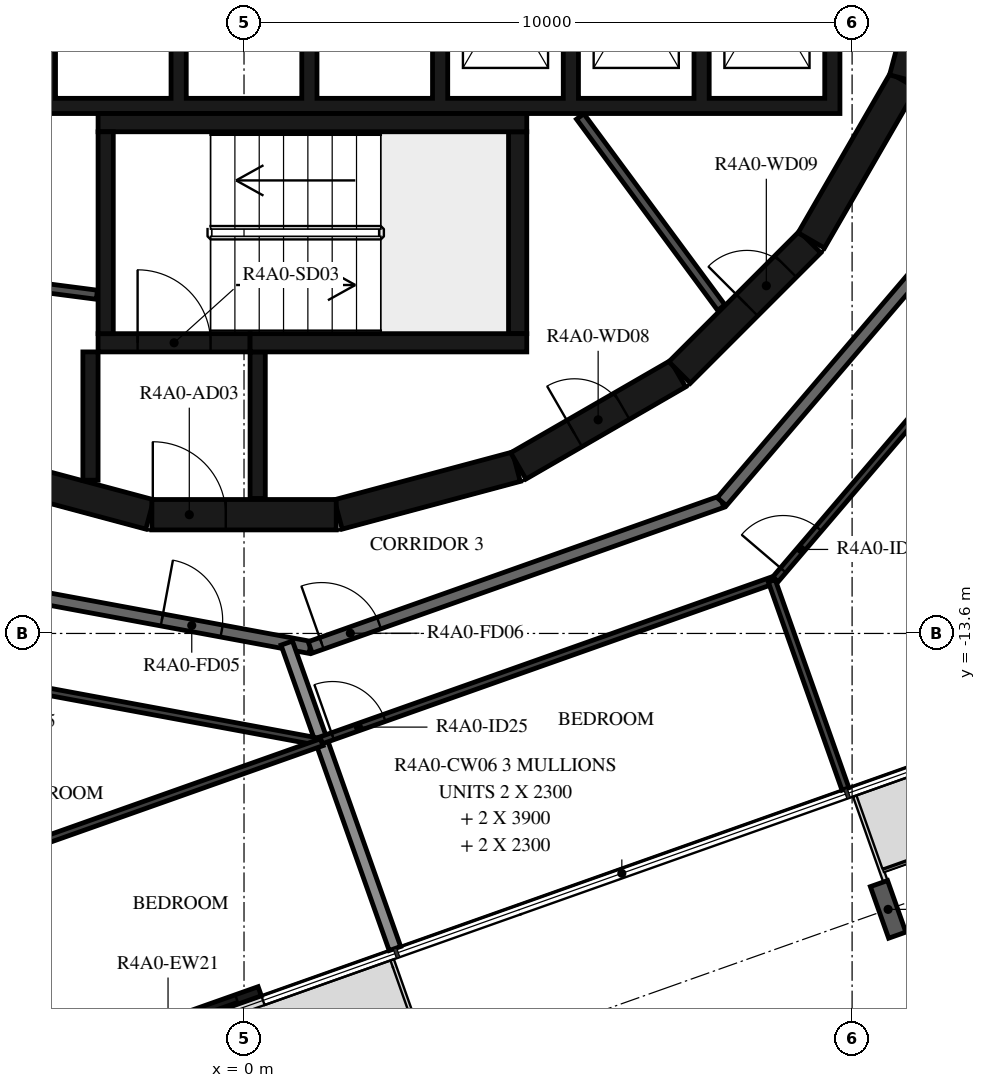
"""IFC4 building model, lengths in metres.
Left out: names, types, materials, properties, quantities, classifications, styles, units other than length and angle.
Written with IfcOpenShell. Run it as: python <this file> out.ifc"""

import sys

from ifc_helpers import new_model, si_unit, direction, frame, frame_2d, origin, origin_2d, place, context, subcontext, project, spatial, polyline, rectangle, i_section, outline, extrude, element, fill, save


model = new_model("IFC4")
c1 = context("Model", 3, precision=1e-05, world=origin(), true_north=direction((0.0, 1.0)))
c2 = subcontext(c1, "Body", "Model", "MODEL_VIEW")
j1 = project(units=[si_unit("LENGTHUNIT", "METRE"), si_unit("PLANEANGLEUNIT", "RADIAN")], contexts=[c1])
p1 = place(None, origin())
s1 = spatial("IfcSite", under=j1, at=p1, CompositionType="ELEMENT")
p2 = place(p1, origin())
s2 = spatial("IfcBuilding", under=s1, at=p2, CompositionType="ELEMENT")
p3 = place(p2, frame((0.0, 0.0, 158.7)))
s3 = spatial("IfcBuildingStorey", under=s2, at=p3, CompositionType="ELEMENT", Elevation=158.7)
p4 = place(p3, frame((10.592, -18.138, -0.38), z_axis=(0.0, 0.0, 1.0), x_axis=(-0.942641392079, -0.333807138839, 0.0)))
e1 = element("IfcColumn", 1, at=p4, inside=s3, PredefinedType="COLUMN", context=c2, shape_type="SweptSolid", body=[
    extrude(i_section(OverallWidth=0.3, OverallDepth=0.9, WebThickness=0.019, FlangeThickness=0.035, FilletRadius=0.03, at=origin_2d()), origin(), (0.0, 0.0, 1.0), 3.5),
])
p5 = place(p3, frame((-2.758, -20.552, 0.0), z_axis=(0.0, 0.0, 1.0), x_axis=(0.94265323131, 0.333773704029, 0.0)))
e2 = element("IfcWall", 2, at=p5, inside=s3, PredefinedType="STANDARD", context=c2, shape_type="SweptSolid", body=[
    extrude(rectangle(XDim=3.2, YDim=0.16, at=frame_2d((1.6, 0.0))), origin(), (0.0, 0.0, 1.0), 3.12),
])
p6 = place(p5, frame((0.4, 0.0, 0.0)))
e3 = element("IfcOpeningElement", 3, at=p6, cuts=e2, PredefinedType="OPENING", context=c2, shape_type="SweptSolid", body=[
    extrude(rectangle(XDim=2.4, YDim=2.4, at=frame_2d((1.2, 1.2))), frame((0.0, 0.09, 0.0), z_axis=(0.0, -1.0, 0.0), x_axis=(1.0, 0.0, 0.0)), (0.0, 0.0, 1.0), 0.18),
])
p7 = place(p3, frame((1.55, -11.643, 0.0), z_axis=(0.0, 0.0, 1.0), x_axis=(0.965948410781, 0.258734743916, 0.0)))
e4 = element("IfcWall", 4, at=p7, inside=s3, PredefinedType="SHEAR", context=c2, shape_type="SweptSolid", body=[
    extrude(rectangle(XDim=3.033, YDim=0.5, at=frame_2d((1.516, 0.0))), origin(), (0.0, 0.0, 1.0), 3.12),
])
p8 = place(p3, frame((4.51, -10.845, 0.0), z_axis=(0.0, 0.0, 1.0), x_axis=(0.865975092491, 0.500087131594, 0.0)))
e5 = element("IfcWall", 5, at=p8, inside=s3, PredefinedType="SHEAR", context=c2, shape_type="SweptSolid", body=[
    extrude(rectangle(XDim=3.033, YDim=0.5, at=frame_2d((1.516, 0.0))), origin(), (0.0, 0.0, 1.0), 3.12),
])
p9 = place(p8, frame((1.066, 0.0, 0.0)))
e6 = element("IfcOpeningElement", 6, at=p9, cuts=e5, PredefinedType="OPENING", context=c2, shape_type="SweptSolid", body=[
    extrude(rectangle(XDim=0.9, YDim=2.1, at=frame_2d((0.45, 1.05))), frame((0.0, 0.26, 0.0), z_axis=(0.0, -1.0, 0.0), x_axis=(1.0, 0.0, 0.0)), (0.0, 0.0, 1.0), 0.52),
])
p10 = place(p3, frame((7.164, -9.308, 0.0), z_axis=(0.0, 0.0, 1.0), x_axis=(0.707106781187, 0.707106781187, 0.0)))
e7 = element("IfcWall", 7, at=p10, inside=s3, PredefinedType="SHEAR", context=c2, shape_type="SweptSolid", body=[
    extrude(rectangle(XDim=3.032, YDim=0.5, at=frame_2d((1.516, 0.0))), origin(), (0.0, 0.0, 1.0), 3.12),
])
p11 = place(p10, frame((1.566, 0.0, 0.0)))
e8 = element("IfcOpeningElement", 8, at=p11, cuts=e7, PredefinedType="OPENING", context=c2, shape_type="SweptSolid", body=[
    extrude(rectangle(XDim=0.9, YDim=2.1, at=frame_2d((0.45, 1.05))), frame((0.0, 0.26, 0.0), z_axis=(0.0, -1.0, 0.0), x_axis=(1.0, 0.0, 0.0)), (0.0, 0.0, 1.0), 0.52),
])
for number, where, z_axis, x_axis in (
    (9, (9.329, -7.137, 0.0), (0.0, 0.0, 1.0), (0.5, 0.866, 0.0)),
    (10, (10.858, -4.479, 0.0), (0.0, 0.0, 1.0), (0.259, 0.966, 0.0)),
    (11, (-4.479, -10.858, 0.0), (0.0, 0.0, 1.0), (0.966, -0.259, 0.0)),
):
    element("IfcWall", number, at=place(p3, frame(where, z_axis=z_axis, x_axis=x_axis)), inside=s3, PredefinedType="SHEAR", context=c2, shape_type="SweptSolid", body=[
        extrude(rectangle(XDim=3.033, YDim=0.5, at=frame_2d((1.516, 0.0))), origin(), (0.0, 0.0, 1.0), 3.12),
    ])
p12 = place(p3, frame((-1.516, -11.647, 0.0), z_axis=(0.0, 0.0, 1.0), x_axis=(1.0, 0.0, 0.0)))
e12 = element("IfcWall", 12, at=p12, inside=s3, PredefinedType="SHEAR", context=c2, shape_type="SweptSolid", body=[
    extrude(rectangle(XDim=3.033, YDim=0.5, at=frame_2d((1.516, 0.0))), origin(), (0.0, 0.0, 1.0), 3.12),
])
p13 = place(p12, frame((0.016, 0.0, 0.0)))
e13 = element("IfcOpeningElement", 13, at=p13, cuts=e12, PredefinedType="OPENING", context=c2, shape_type="SweptSolid", body=[
    extrude(rectangle(XDim=1.2, YDim=2.1, at=frame_2d((0.6, 1.05))), frame((0.0, 0.26, 0.0), z_axis=(0.0, -1.0, 0.0), x_axis=(1.0, 0.0, 0.0)), (0.0, 0.0, 1.0), 0.52),
])
p14 = place(p3, frame((-2.275, -8.67, 0.0), z_axis=(0.0, 0.0, 1.0), x_axis=(0.0, 1.0, 0.0)))
e14 = element("IfcWall", 14, at=p14, inside=s3, PredefinedType="SHEAR", context=c2, shape_type="SweptSolid", body=[
    extrude(rectangle(XDim=3.32, YDim=0.25, at=frame_2d((1.66, 0.0))), origin(), (0.0, 0.0, 1.0), 3.12),
])
p15 = place(p3, frame((-2.4, -5.2, 0.0), z_axis=(0.0, 0.0, 1.0), x_axis=(1.0, 0.0, 0.0)))
e15 = element("IfcWall", 15, at=p15, inside=s3, PredefinedType="SHEAR", context=c2, shape_type="SweptSolid", body=[
    extrude(rectangle(XDim=7.05, YDim=0.3, at=frame_2d((3.525, 0.0))), origin(), (0.0, 0.0, 1.0), 3.12),
])
p16 = place(p3, frame((4.5, -8.67, 0.0), z_axis=(0.0, 0.0, 1.0), x_axis=(0.0, 1.0, 0.0)))
e16 = element("IfcWall", 16, at=p16, inside=s3, PredefinedType="SHEAR", context=c2, shape_type="SweptSolid", body=[
    extrude(rectangle(XDim=3.32, YDim=0.3, at=frame_2d((1.66, 0.0))), origin(), (0.0, 0.0, 1.0), 3.12),
])
p17 = place(p3, frame((0.1, -8.82, 0.0), z_axis=(0.0, 0.0, 1.0), x_axis=(1.0, 0.0, 0.0)))
e17 = element("IfcWall", 17, at=p17, inside=s3, PredefinedType="SHEAR", context=c2, shape_type="SweptSolid", body=[
    extrude(rectangle(XDim=4.55, YDim=0.3, at=frame_2d((2.275, 0.0))), origin(), (0.0, 0.0, 1.0), 3.12),
])
p18 = place(p3, frame((-2.4, -8.82, 0.0), z_axis=(0.0, 0.0, 1.0), x_axis=(1.0, 0.0, 0.0)))
e18 = element("IfcWall", 18, at=p18, inside=s3, PredefinedType="SHEAR", context=c2, shape_type="SweptSolid", body=[
    extrude(rectangle(XDim=2.5, YDim=0.3, at=frame_2d((1.25, 0.0))), origin(), (0.0, 0.0, 1.0), 3.12),
])
p19 = place(p18, frame((0.65, 0.0, 0.0)))
e19 = element("IfcOpeningElement", 19, at=p19, cuts=e18, PredefinedType="OPENING", context=c2, shape_type="SweptSolid", body=[
    extrude(rectangle(XDim=1.2, YDim=2.1, at=frame_2d((0.6, 1.05))), frame((0.0, 0.16, 0.0), z_axis=(0.0, -1.0, 0.0), x_axis=(1.0, 0.0, 0.0)), (0.0, 0.0, 1.0), 0.32),
])
p20 = place(p3, frame((-2.525, -8.97, 0.0), z_axis=(0.0, 0.0, 1.0), x_axis=(0.0, -1.0, 0.0)))
e20 = element("IfcWall", 20, at=p20, inside=s3, PredefinedType="SHEAR", context=c2, shape_type="SweptSolid", body=[
    extrude(rectangle(XDim=2.11, YDim=0.25, at=frame_2d((1.055, 0.0))), origin(), (0.0, 0.0, 1.0), 3.12),
])
p21 = place(p3, frame((0.225, -8.97, 0.0), z_axis=(0.0, 0.0, 1.0), x_axis=(0.0, -1.0, 0.0)))
e21 = element("IfcWall", 21, at=p21, inside=s3, PredefinedType="SHEAR", context=c2, shape_type="SweptSolid", body=[
    extrude(rectangle(XDim=2.41, YDim=0.25, at=frame_2d((1.205, 0.0))), origin(), (0.0, 0.0, 1.0), 3.12),
])
p22 = place(p3, origin())
e22 = element("IfcWall", 22, at=p22, inside=s3, PredefinedType="SHEAR", context=c2, shape_type="SweptSolid", body=[
    extrude(outline(polyline([(9.8, -5.05), (9.8, -4.8), (9.8, -1.9), (9.55, -1.9), (9.55, -4.8), (7.65, -4.8), (7.65, -1.9), (7.4, -1.9), (7.4, -4.8), (5.5, -4.8), (5.5, -1.9), (5.25, -1.9), (5.25, -4.8), (3.35, -4.8), (3.35, -1.9), (3.1, -1.9), (3.1, -4.8), (1.2, -4.8), (1.2, -1.9), (0.95, -1.9), (0.95, -4.8), (-0.95, -4.8), (-0.95, -1.9), (-1.2, -1.9), (-1.2, -4.8), (-3.1, -4.8), (-3.1, -1.9), (-3.35, -1.9), (-3.35, -4.8), (-5.25, -4.8), (-5.25, -1.9), (-5.5, -1.9), (-5.5, -4.8), (-7.4, -4.8), (-7.4, -1.9), (-7.65, -1.9), (-7.65, -4.8), (-9.55, -4.8), (-9.55, -1.9), (-9.8, -1.9), (-9.8, -4.8), (-9.8, -5.05), (9.8, -5.05)])), origin(), (0.0, 0.0, 1.0), 3.12),
])
p23 = place(p3, frame((5.528, -5.098, 0.0), z_axis=(0.0, 0.0, 1.0), x_axis=(0.594034318069, -0.804439698769, 0.0)))
e23 = element("IfcWall", 23, at=p23, inside=s3, PredefinedType="PARTITIONING", context=c2, shape_type="SweptSolid", body=[
    extrude(rectangle(XDim=3.907, YDim=0.15, at=frame_2d((1.953, 0.0))), origin(), (0.0, 0.0, 1.0), 3.12),
])
p24 = place(p3, frame((-4.198, -7.799, 0.0), z_axis=(0.0, 0.0, 1.0), x_axis=(0.991686747293, -0.128675542523, 0.0)))
e24 = element("IfcWall", 24, at=p24, inside=s3, PredefinedType="PARTITIONING", context=c2, shape_type="SweptSolid", body=[
    extrude(rectangle(XDim=1.793, YDim=0.15, at=frame_2d((0.896, 0.0))), origin(), (0.0, 0.0, 1.0), 3.12),
])
p25 = place(p3, frame((-5.972, -12.521, 0.0), z_axis=(0.0, 0.0, 1.0), x_axis=(0.983256068163, -0.18222926335, 0.0)))
e25 = element("IfcWall", 25, at=p25, inside=s3, PredefinedType="STANDARD", context=c2, shape_type="SweptSolid", body=[
    extrude(rectangle(XDim=7.181, YDim=0.2, at=frame_2d((3.59, 0.0))), origin(), (0.0, 0.0, 1.0), 3.12),
])
p26 = place(p25, frame((4.7, 0.0, 0.0)))
e26 = element("IfcOpeningElement", 26, at=p26, cuts=e25, PredefinedType="OPENING", context=c2, shape_type="SweptSolid", body=[
    extrude(rectangle(XDim=1.0, YDim=2.1, at=frame_2d((0.5, 1.05))), frame((0.0, 0.11, 0.0), z_axis=(0.0, -1.0, 0.0), x_axis=(1.0, 0.0, 0.0)), (0.0, 0.0, 1.0), 0.22),
])
p27 = place(p3, frame((1.088, -13.83, 0.0), z_axis=(0.0, 0.0, 1.0), x_axis=(0.942648397945, 0.333787354241, 0.0)))
e27 = element("IfcWall", 27, at=p27, inside=s3, PredefinedType="STANDARD", context=c2, shape_type="SweptSolid", body=[
    extrude(rectangle(XDim=7.181, YDim=0.2, at=frame_2d((3.591, 0.0))), origin(), (0.0, 0.0, 1.0), 3.12),
])
p28 = place(p27, frame((0.2, 0.0, 0.0)))
e28 = element("IfcOpeningElement", 28, at=p28, cuts=e27, PredefinedType="OPENING", context=c2, shape_type="SweptSolid", body=[
    extrude(rectangle(XDim=1.0, YDim=2.1, at=frame_2d((0.5, 1.05))), frame((0.0, 0.11, 0.0), z_axis=(0.0, -1.0, 0.0), x_axis=(1.0, 0.0, 0.0)), (0.0, 0.0, 1.0), 0.22),
])
p29 = place(p3, frame((7.858, -11.433, 0.0), z_axis=(0.0, 0.0, 1.0), x_axis=(0.649440801937, 0.760412154545, 0.0)))
e29 = element("IfcWall", 29, at=p29, inside=s3, PredefinedType="STANDARD", context=c2, shape_type="SweptSolid", body=[
    extrude(rectangle(XDim=7.181, YDim=0.2, at=frame_2d((3.59, 0.0))), origin(), (0.0, 0.0, 1.0), 3.12),
])
p30 = place(p3, frame((2.482, -18.782, 0.0), z_axis=(0.0, 0.0, 1.0), x_axis=(-0.333807281402, 0.942641341594, 0.0)))
e30 = element("IfcWall", 30, at=p30, inside=s3, PredefinedType="STANDARD", context=c2, shape_type="SweptSolid", body=[
    extrude(rectangle(XDim=5.329, YDim=0.2, at=frame_2d((2.665, 0.0))), origin(), (0.0, 0.0, 1.0), 2.73),
])
p31 = place(p3, frame((-6.641, -13.923, 0.0), z_axis=(0.0, 0.0, 1.0), x_axis=(0.983250157272, -0.182261153912, 0.0)))
e31 = element("IfcWall", 31, at=p31, inside=s3, PredefinedType="PARTITIONING", context=c2, shape_type="SweptSolid", body=[
    extrude(rectangle(XDim=7.985, YDim=0.12, at=frame_2d((3.992, 0.0))), origin(), (0.0, 0.0, 1.0), 3.12),
])
p32 = place(p31, frame((1.612, 0.0, 0.0)))
e32 = element("IfcOpeningElement", 32, at=p32, cuts=e31, PredefinedType="OPENING", context=c2, shape_type="SweptSolid", body=[
    extrude(rectangle(XDim=0.8, YDim=2.1, at=frame_2d((0.4, 1.05))), frame((0.0, 0.07, 0.0), z_axis=(0.0, -1.0, 0.0), x_axis=(1.0, 0.0, 0.0)), (0.0, 0.0, 1.0), 0.14),
])
p33 = place(p3, frame((-4.17, -17.318, 0.0), z_axis=(0.0, 0.0, 1.0), x_axis=(0.942641343532, 0.333807275931, 0.0)))
e33 = element("IfcWall", 33, at=p33, inside=s3, PredefinedType="PARTITIONING", context=c2, shape_type="SweptSolid", body=[
    extrude(rectangle(XDim=5.781, YDim=0.12, at=frame_2d((2.891, 0.0))), origin(), (0.0, 0.0, 1.0), 3.12),
])
p34 = place(p3, frame((1.269, -15.357, 0.0), z_axis=(0.0, 0.0, 1.0), x_axis=(0.942639442898, 0.333812643101, 0.0)))
e34 = element("IfcWall", 34, at=p34, inside=s3, PredefinedType="PARTITIONING", context=c2, shape_type="SweptSolid", body=[
    extrude(rectangle(XDim=7.86, YDim=0.12, at=frame_2d((3.93, 0.0))), origin(), (0.0, 0.0, 1.0), 3.12),
])
p35 = place(p34, frame((0.2, 0.0, 0.0)))
e35 = element("IfcOpeningElement", 35, at=p35, cuts=e34, PredefinedType="OPENING", context=c2, shape_type="SweptSolid", body=[
    extrude(rectangle(XDim=0.9, YDim=2.1, at=frame_2d((0.45, 1.05))), frame((0.0, 0.07, 0.0), z_axis=(0.0, -1.0, 0.0), x_axis=(1.0, 0.0, 0.0)), (0.0, 0.0, 1.0), 0.14),
])
p36 = place(p3, frame((8.737, -12.713, 0.0), z_axis=(0.0, 0.0, 1.0), x_axis=(0.649430604754, 0.760420863476, 0.0)))
e36 = element("IfcWall", 36, at=p36, inside=s3, PredefinedType="PARTITIONING", context=c2, shape_type="SweptSolid", body=[
    extrude(rectangle(XDim=7.985, YDim=0.12, at=frame_2d((3.992, 0.0))), origin(), (0.0, 0.0, 1.0), 3.12),
])
p37 = place(p36, frame((0.2, 0.0, 0.0)))
e37 = element("IfcOpeningElement", 37, at=p37, cuts=e36, PredefinedType="OPENING", context=c2, shape_type="SweptSolid", body=[
    extrude(rectangle(XDim=0.9, YDim=2.1, at=frame_2d((0.45, 1.05))), frame((0.0, 0.07, 0.0), z_axis=(0.0, -1.0, 0.0), x_axis=(1.0, 0.0, 0.0)), (0.0, 0.0, 1.0), 0.14),
])
p38 = place(p36, frame((6.234, 0.0, 0.0)))
e38 = element("IfcOpeningElement", 38, at=p38, cuts=e36, PredefinedType="OPENING", context=c2, shape_type="SweptSolid", body=[
    extrude(rectangle(XDim=0.8, YDim=2.1, at=frame_2d((0.4, 1.05))), frame((0.0, 0.07, 0.0), z_axis=(0.0, -1.0, 0.0), x_axis=(1.0, 0.0, 0.0)), (0.0, 0.0, 1.0), 0.14),
])
p39 = place(p3, frame((9.891, -16.158, 0.0), z_axis=(0.0, 0.0, 1.0), x_axis=(-0.33385336213, 0.942625022262, 0.0)))
e39 = element("IfcWall", 39, at=p39, inside=s3, PredefinedType="PARTITIONING", context=c2, shape_type="SweptSolid", body=[
    extrude(rectangle(XDim=3.633, YDim=0.12, at=frame_2d((1.816, 0.0))), origin(), (0.0, 0.0, 1.0), 2.73),
])
p40 = place(p6, origin())
e40 = element("IfcDoor", 40, at=p40, inside=s3, OperationType="DOUBLE_DOOR_SLIDING", PredefinedType="DOOR", context=c2, shape_type="SweptSolid", body=[
    extrude(rectangle(XDim=2.4, YDim=2.4, at=frame_2d((1.2, 1.2))), frame((0.0, 0.025, 0.0), z_axis=(0.0, -1.0, 0.0), x_axis=(1.0, 0.0, 0.0)), (0.0, 0.0, 1.0), 0.05),
])
fill(e3, e40)
p41 = place(p19, origin())
e41 = element("IfcDoor", 41, at=p41, inside=s3, OperationType="SINGLE_SWING_LEFT", PredefinedType="DOOR", context=c2, shape_type="SweptSolid", body=[
    extrude(rectangle(XDim=1.2, YDim=2.1, at=frame_2d((0.6, 1.05))), frame((0.0, 0.025, 0.0), z_axis=(0.0, -1.0, 0.0), x_axis=(1.0, 0.0, 0.0)), (0.0, 0.0, 1.0), 0.05),
])
fill(e19, e41)
p42 = place(p13, origin())
e42 = element("IfcDoor", 42, at=p42, inside=s3, OperationType="SINGLE_SWING_RIGHT", PredefinedType="DOOR", context=c2, shape_type="SweptSolid", body=[
    extrude(rectangle(XDim=1.2, YDim=2.1, at=frame_2d((0.6, 1.05))), frame((0.0, 0.025, 0.0), z_axis=(0.0, -1.0, 0.0), x_axis=(1.0, 0.0, 0.0)), (0.0, 0.0, 1.0), 0.05),
])
fill(e13, e42)
p43 = place(p9, origin())
e43 = element("IfcDoor", 43, at=p43, inside=s3, OperationType="SINGLE_SWING_RIGHT", PredefinedType="DOOR", context=c2, shape_type="SweptSolid", body=[
    extrude(rectangle(XDim=0.9, YDim=2.1, at=frame_2d((0.45, 1.05))), frame((0.0, 0.025, 0.0), z_axis=(0.0, -1.0, 0.0), x_axis=(1.0, 0.0, 0.0)), (0.0, 0.0, 1.0), 0.05),
])
fill(e6, e43)
p44 = place(p11, origin())
e44 = element("IfcDoor", 44, at=p44, inside=s3, OperationType="SINGLE_SWING_LEFT", PredefinedType="DOOR", context=c2, shape_type="SweptSolid", body=[
    extrude(rectangle(XDim=0.9, YDim=2.1, at=frame_2d((0.45, 1.05))), frame((0.0, 0.025, 0.0), z_axis=(0.0, -1.0, 0.0), x_axis=(1.0, 0.0, 0.0)), (0.0, 0.0, 1.0), 0.05),
])
fill(e8, e44)
p45 = place(p26, origin())
e45 = element("IfcDoor", 45, at=p45, inside=s3, OperationType="SINGLE_SWING_LEFT", PredefinedType="DOOR", context=c2, shape_type="SweptSolid", body=[
    extrude(rectangle(XDim=1.0, YDim=2.1, at=frame_2d((0.5, 1.05))), frame((0.0, 0.025, 0.0), z_axis=(0.0, -1.0, 0.0), x_axis=(1.0, 0.0, 0.0)), (0.0, 0.0, 1.0), 0.05),
])
fill(e26, e45)
p46 = place(p28, origin())
e46 = element("IfcDoor", 46, at=p46, inside=s3, OperationType="SINGLE_SWING_LEFT", PredefinedType="DOOR", context=c2, shape_type="SweptSolid", body=[
    extrude(rectangle(XDim=1.0, YDim=2.1, at=frame_2d((0.5, 1.05))), frame((0.0, 0.025, 0.0), z_axis=(0.0, -1.0, 0.0), x_axis=(1.0, 0.0, 0.0)), (0.0, 0.0, 1.0), 0.05),
])
fill(e28, e46)
p47 = place(p35, origin())
e47 = element("IfcDoor", 47, at=p47, inside=s3, OperationType="SINGLE_SWING_LEFT", PredefinedType="DOOR", context=c2, shape_type="SweptSolid", body=[
    extrude(rectangle(XDim=0.9, YDim=2.1, at=frame_2d((0.45, 1.05))), frame((0.0, 0.025, 0.0), z_axis=(0.0, -1.0, 0.0), x_axis=(1.0, 0.0, 0.0)), (0.0, 0.0, 1.0), 0.05),
])
fill(e35, e47)
p48 = place(p37, origin())
e48 = element("IfcDoor", 48, at=p48, inside=s3, OperationType="SINGLE_SWING_RIGHT", PredefinedType="DOOR", context=c2, shape_type="SweptSolid", body=[
    extrude(rectangle(XDim=0.9, YDim=2.1, at=frame_2d((0.45, 1.05))), frame((0.0, 0.025, 0.0), z_axis=(0.0, -1.0, 0.0), x_axis=(1.0, 0.0, 0.0)), (0.0, 0.0, 1.0), 0.05),
])
fill(e37, e48)
save(model, sys.argv[1])
